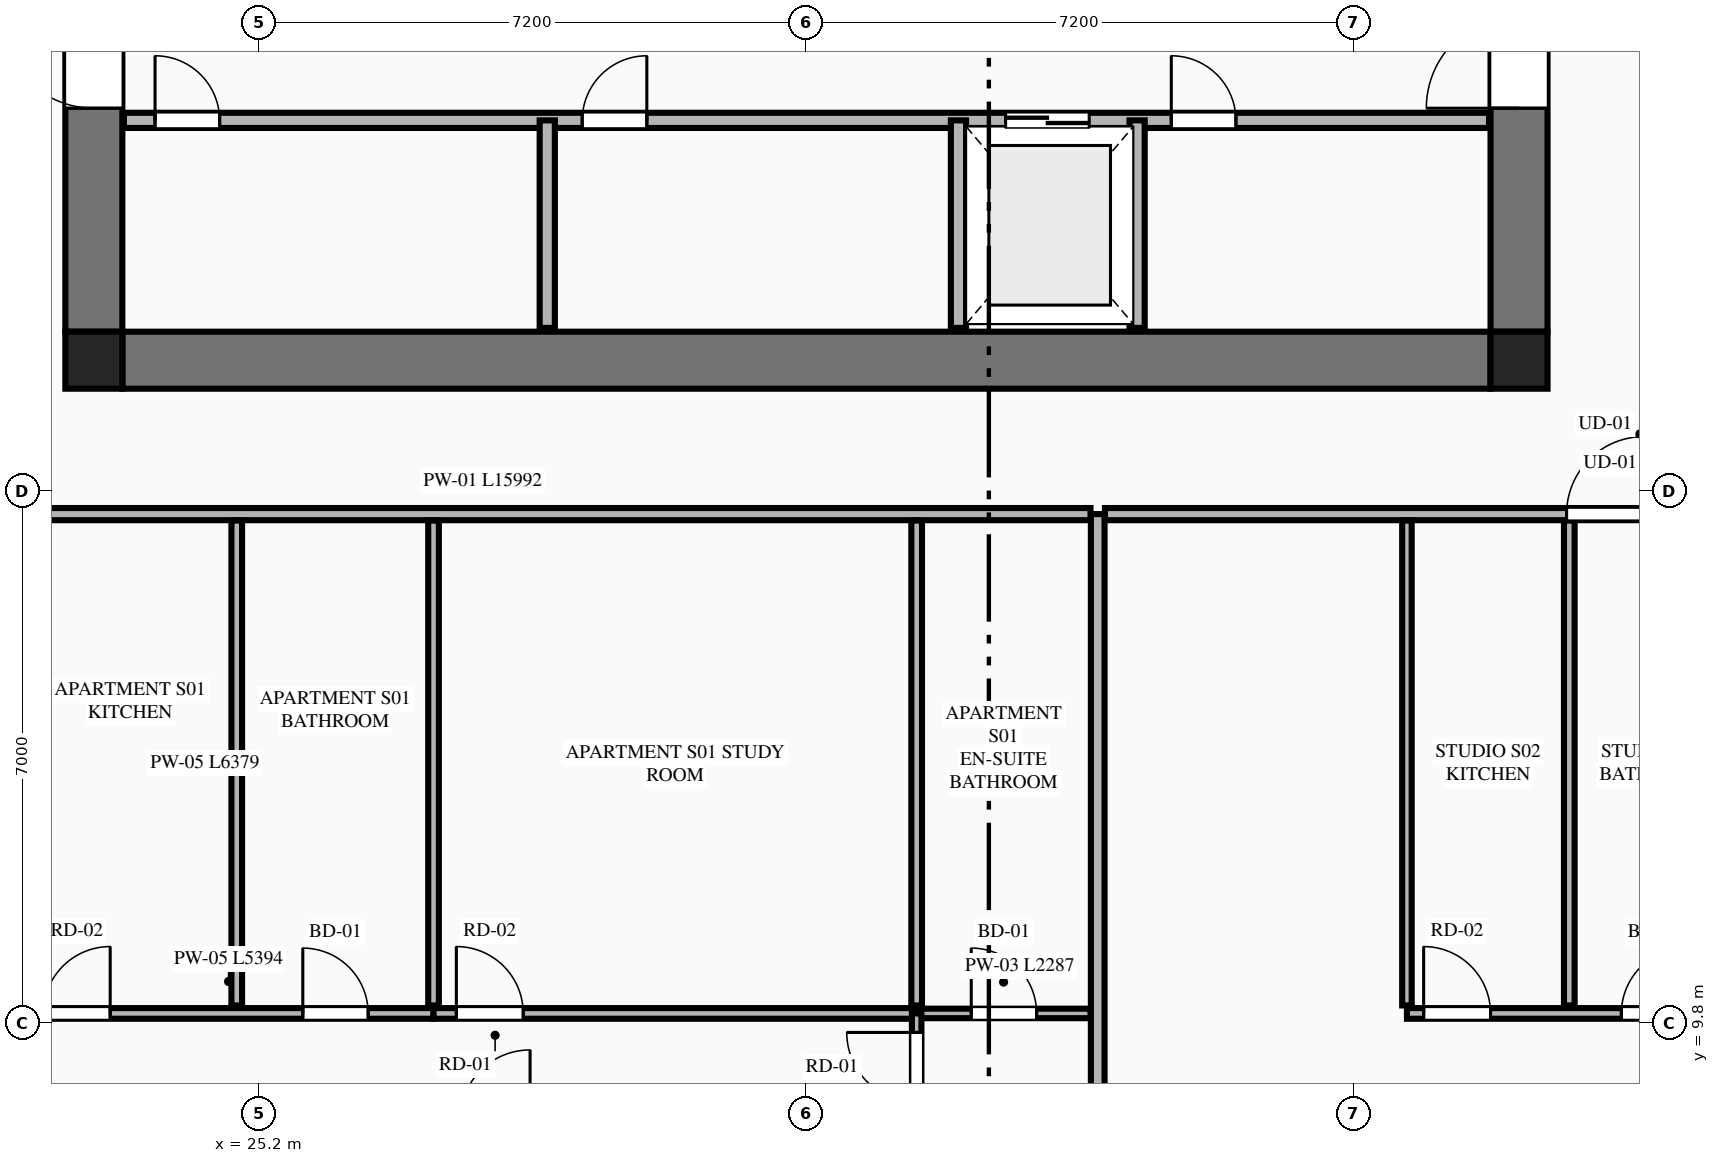
"""IFC4 building model, lengths in metres.
Left out: names, types, materials, properties, quantities, classifications, styles, units other than length and angle.
Written with IfcOpenShell. Run it as: python <this file> out.ifc"""

import sys

from ifc_helpers import new_model, si_unit, direction, frame, frame_2d, origin, origin_2d, place, context, subcontext, project, spatial, rectangle, extrude, element, fill, save


model = new_model("IFC4")
c1 = context("Model", 3, precision=1e-05, world=origin(), true_north=direction((0.0, 1.0)))
c2 = subcontext(c1, "Body", "Model", "MODEL_VIEW")
j1 = project(units=[si_unit("LENGTHUNIT", "METRE"), si_unit("PLANEANGLEUNIT", "RADIAN")], contexts=[c1])
p1 = place(None, origin())
s1 = spatial("IfcSite", under=j1, at=p1, CompositionType="ELEMENT")
p2 = place(p1, origin())
s2 = spatial("IfcBuilding", under=s1, at=p2, CompositionType="ELEMENT")
p3 = place(p2, frame((0.0, 0.0, 105.5)))
s3 = spatial("IfcBuildingStorey", under=s2, at=p3, CompositionType="ELEMENT", Elevation=105.5)
for number, where, z_axis, x_axis in (
    (1, (23.025, 18.525, 0.0), (0.0, 0.0, 1.0), (1.0, 0.0, 0.0)),
    (2, (41.775, 18.525, 0.0), (0.0, 0.0, 1.0), (1.0, 0.0, 0.0)),
):
    element("IfcColumn", number, at=place(p3, frame(where, z_axis=z_axis, x_axis=x_axis)), inside=s3, PredefinedType="COLUMN", context=c2, shape_type="SweptSolid", body=[
        extrude(rectangle(XDim=0.75, YDim=0.75, at=origin_2d()), origin(), (0.0, 0.0, 1.0), 3.55),
    ])
p4 = place(p3, frame((23.4, 18.525, 0.0), z_axis=(0.0, 0.0, 1.0), x_axis=(1.0, 0.0, 0.0)))
e3 = element("IfcWall", 3, at=p4, inside=s3, PredefinedType="SHEAR", context=c2, shape_type="SweptSolid", body=[
    extrude(rectangle(XDim=18.0, YDim=0.75, at=frame_2d((9.0, 0.0))), origin(), (0.0, 0.0, 1.0), 3.34),
])
p5 = place(p3, frame((23.025, 18.9, 0.0), z_axis=(0.0, 0.0, 1.0), x_axis=(0.0, 1.0, 0.0)))
e4 = element("IfcWall", 4, at=p5, inside=s3, PredefinedType="SHEAR", context=c2, shape_type="SweptSolid", body=[
    extrude(rectangle(XDim=14.0, YDim=0.75, at=frame_2d((7.0, 0.0))), origin(), (0.0, 0.0, 1.0), 3.34),
])
p6 = place(p5, frame((2.94, 0.0, 0.0)))
e5 = element("IfcOpeningElement", 5, at=p6, cuts=e4, PredefinedType="OPENING", context=c2, shape_type="SweptSolid", body=[
    extrude(rectangle(XDim=1.22, YDim=2.25, at=frame_2d((0.61, 1.125))), frame((0.0, 0.385, 0.0), z_axis=(0.0, -1.0, 0.0), x_axis=(1.0, 0.0, 0.0)), (0.0, 0.0, 1.0), 0.77),
])
p7 = place(p3, frame((41.775, 18.9, 0.0), z_axis=(0.0, 0.0, 1.0), x_axis=(0.0, 1.0, 0.0)))
e6 = element("IfcWall", 6, at=p7, inside=s3, PredefinedType="SHEAR", context=c2, shape_type="SweptSolid", body=[
    extrude(rectangle(XDim=14.0, YDim=0.75, at=frame_2d((7.0, 0.0))), origin(), (0.0, 0.0, 1.0), 3.34),
])
p8 = place(p7, frame((2.94, 0.0, 0.0)))
e7 = element("IfcOpeningElement", 7, at=p8, cuts=e6, PredefinedType="OPENING", context=c2, shape_type="SweptSolid", body=[
    extrude(rectangle(XDim=1.22, YDim=2.25, at=frame_2d((0.61, 1.125))), frame((0.0, 0.385, 0.0), z_axis=(0.0, -1.0, 0.0), x_axis=(1.0, 0.0, 0.0)), (0.0, 0.0, 1.0), 0.77),
])
p9 = place(p3, frame((23.42, 21.68, 0.0), z_axis=(0.0, 0.0, 1.0), x_axis=(1.0, 0.0, 0.0)))
e8 = element("IfcWall", 8, at=p9, inside=s3, PredefinedType="PLUMBINGWALL", context=c2, shape_type="SweptSolid", body=[
    extrude(rectangle(XDim=17.96, YDim=0.2, at=frame_2d((8.98, 0.0))), origin(), (0.0, 0.0, 1.0), 3.34),
])
p10 = place(p9, frame((11.6, 0.0, 0.0)))
e9 = element("IfcOpeningElement", 9, at=p10, cuts=e8, PredefinedType="OPENING", context=c2, shape_type="SweptSolid", body=[
    extrude(rectangle(XDim=1.1, YDim=2.2, at=frame_2d((0.55, 1.1))), frame((0.0, 0.11, 0.0), z_axis=(0.0, -1.0, 0.0), x_axis=(1.0, 0.0, 0.0)), (0.0, 0.0, 1.0), 0.22),
])
p11 = place(p9, frame((0.41, 0.0, 0.0)))
e10 = element("IfcOpeningElement", 10, at=p11, cuts=e8, PredefinedType="OPENING", context=c2, shape_type="SweptSolid", body=[
    extrude(rectangle(XDim=0.85, YDim=2.05, at=frame_2d((0.425, 1.025))), frame((0.0, 0.11, 0.0), z_axis=(0.0, -1.0, 0.0), x_axis=(1.0, 0.0, 0.0)), (0.0, 0.0, 1.0), 0.22),
])
p12 = place(p9, frame((6.03, 0.0, 0.0)))
e11 = element("IfcOpeningElement", 11, at=p12, cuts=e8, PredefinedType="OPENING", context=c2, shape_type="SweptSolid", body=[
    extrude(rectangle(XDim=0.85, YDim=2.05, at=frame_2d((0.425, 1.025))), frame((0.0, 0.11, 0.0), z_axis=(0.0, -1.0, 0.0), x_axis=(1.0, 0.0, 0.0)), (0.0, 0.0, 1.0), 0.22),
])
p13 = place(p9, frame((13.78, 0.0, 0.0)))
e12 = element("IfcOpeningElement", 12, at=p13, cuts=e8, PredefinedType="OPENING", context=c2, shape_type="SweptSolid", body=[
    extrude(rectangle(XDim=0.85, YDim=2.05, at=frame_2d((0.425, 1.025))), frame((0.0, 0.11, 0.0), z_axis=(0.0, -1.0, 0.0), x_axis=(1.0, 0.0, 0.0)), (0.0, 0.0, 1.0), 0.22),
])
for number, where, z_axis, x_axis in (
    (13, (34.4, 18.95, 0.0), (0.0, 0.0, 1.0), (0.0, 1.0, 0.0)),
    (14, (36.75, 18.95, 0.0), (0.0, 0.0, 1.0), (0.0, 1.0, 0.0)),
    (15, (28.99, 18.95, 0.0), (0.0, 0.0, 1.0), (0.0, 1.0, 0.0)),
):
    element("IfcWall", number, at=place(p3, frame(where, z_axis=z_axis, x_axis=x_axis)), inside=s3, PredefinedType="PLUMBINGWALL", context=c2, shape_type="SweptSolid", body=[
        extrude(rectangle(XDim=2.73, YDim=0.2, at=frame_2d((1.365, 0.0))), origin(), (0.0, 0.0, 1.0), 3.34),
    ])
p14 = place(p3, frame((36.232, 4.105, 0.0), z_axis=(0.0, 0.0, 1.0), x_axis=(0.0, 1.0, 0.0)))
e16 = element("IfcWall", 16, at=p14, inside=s3, PredefinedType="PARTITIONING", context=c2, shape_type="SweptSolid", body=[
    extrude(rectangle(XDim=12.395, YDim=0.18, at=frame_2d((6.198, 0.0))), origin(), (0.0, 0.0, 1.0), 2.722),
])
p15 = place(p3, frame((20.145, 16.5, 0.0), z_axis=(0.0, 0.0, 1.0), x_axis=(1.0, 0.0, 0.0)))
e17 = element("IfcWall", 17, at=p15, inside=s3, PredefinedType="PARTITIONING", context=c2, shape_type="SweptSolid", body=[
    extrude(rectangle(XDim=15.992, YDim=0.16, at=frame_2d((7.996, 0.0))), origin(), (0.0, 0.0, 1.0), 3.34),
])
p16 = place(p15, frame((0.405, 0.0, 0.0)))
e18 = element("IfcOpeningElement", 18, at=p16, cuts=e17, PredefinedType="OPENING", context=c2, shape_type="SweptSolid", body=[
    extrude(rectangle(XDim=1.35, YDim=2.35, at=frame_2d((0.675, 1.175))), frame((0.0, 0.09, 0.0), z_axis=(0.0, -1.0, 0.0), x_axis=(1.0, 0.0, 0.0)), (0.0, 0.0, 1.0), 0.18),
])
p17 = place(p3, frame((22.1, 9.931, 0.0), z_axis=(0.0, 0.0, 1.0), x_axis=(1.0, 0.0, 0.0)))
e19 = element("IfcWall", 19, at=p17, inside=s3, PredefinedType="PLUMBINGWALL", context=c2, shape_type="SweptSolid", body=[
    extrude(rectangle(XDim=5.394, YDim=0.14, at=frame_2d((2.697, 0.0))), origin(), (0.0, 0.0, 1.0), 3.34),
])
p18 = place(p17, frame((3.674, 0.0, 0.0)))
e20 = element("IfcOpeningElement", 20, at=p18, cuts=e19, PredefinedType="OPENING", context=c2, shape_type="SweptSolid", body=[
    extrude(rectangle(XDim=0.86, YDim=2.1, at=frame_2d((0.43, 1.05))), frame((0.0, 0.08, 0.0), z_axis=(0.0, -1.0, 0.0), x_axis=(1.0, 0.0, 0.0)), (0.0, 0.0, 1.0), 0.16),
])
p19 = place(p17, frame((0.26, 0.0, 0.0)))
e21 = element("IfcOpeningElement", 21, at=p19, cuts=e19, PredefinedType="OPENING", context=c2, shape_type="SweptSolid", body=[
    extrude(rectangle(XDim=0.88, YDim=2.15, at=frame_2d((0.44, 1.075))), frame((0.0, 0.08, 0.0), z_axis=(0.0, -1.0, 0.0), x_axis=(1.0, 0.0, 0.0)), (0.0, 0.0, 1.0), 0.16),
])
p20 = place(p3, frame((27.494, 9.931, 0.0), z_axis=(0.0, 0.0, 1.0), x_axis=(1.0, 0.0, 0.0)))
e22 = element("IfcWall", 22, at=p20, inside=s3, PredefinedType="PLUMBINGWALL", context=c2, shape_type="SweptSolid", body=[
    extrude(rectangle(XDim=6.356, YDim=0.14, at=frame_2d((3.178, 0.0))), origin(), (0.0, 0.0, 1.0), 3.34),
])
p21 = place(p20, frame((0.3, 0.0, 0.0)))
e23 = element("IfcOpeningElement", 23, at=p21, cuts=e22, PredefinedType="OPENING", context=c2, shape_type="SweptSolid", body=[
    extrude(rectangle(XDim=0.88, YDim=2.15, at=frame_2d((0.44, 1.075))), frame((0.0, 0.08, 0.0), z_axis=(0.0, -1.0, 0.0), x_axis=(1.0, 0.0, 0.0)), (0.0, 0.0, 1.0), 0.16),
])
p22 = place(p3, frame((33.85, 9.931, 0.0), z_axis=(0.0, 0.0, 1.0), x_axis=(1.0, 0.0, 0.0)))
e24 = element("IfcWall", 24, at=p22, inside=s3, PredefinedType="PARTITIONING", context=c2, shape_type="SweptSolid", body=[
    extrude(rectangle(XDim=2.287, YDim=0.125, at=frame_2d((1.144, 0.0))), origin(), (0.0, 0.0, 1.0), 3.34),
])
p23 = place(p22, frame((0.718, 0.0, 0.0)))
e25 = element("IfcOpeningElement", 25, at=p23, cuts=e24, PredefinedType="OPENING", context=c2, shape_type="SweptSolid", body=[
    extrude(rectangle(XDim=0.86, YDim=2.1, at=frame_2d((0.43, 1.05))), frame((0.0, 0.073, 0.0), z_axis=(0.0, -1.0, 0.0), x_axis=(1.0, 0.0, 0.0)), (0.0, 0.0, 1.0), 0.145),
])
p24 = place(p3, frame((24.905, 10.036, 0.0), z_axis=(0.0, 0.0, 1.0), x_axis=(0.0, 1.0, 0.0)))
e26 = element("IfcWall", 26, at=p24, inside=s3, PredefinedType="PLUMBINGWALL", context=c2, shape_type="SweptSolid", body=[
    extrude(rectangle(XDim=6.379, YDim=0.14, at=frame_2d((3.189, 0.0))), origin(), (0.0, 0.0, 1.0), 3.34),
])
p25 = place(p3, frame((33.85, 8.601, 0.0), z_axis=(0.0, 0.0, 1.0), x_axis=(0.0, 1.0, 0.0)))
e27 = element("IfcWall", 27, at=p25, inside=s3, PredefinedType="PARTITIONING", context=c2, shape_type="SweptSolid", body=[
    extrude(rectangle(XDim=1.33, YDim=0.125, at=frame_2d((0.665, 0.0))), origin(), (0.0, 0.0, 1.0), 3.34),
])
p26 = place(p25, frame((0.16, 0.0, 0.0)))
e28 = element("IfcOpeningElement", 28, at=p26, cuts=e27, PredefinedType="OPENING", context=c2, shape_type="SweptSolid", body=[
    extrude(rectangle(XDim=0.92, YDim=2.15, at=frame_2d((0.46, 1.075))), frame((0.0, 0.073, 0.0), z_axis=(0.0, -1.0, 0.0), x_axis=(1.0, 0.0, 0.0)), (0.0, 0.0, 1.0), 0.145),
])
for number, where, z_axis, x_axis in (
    (29, (27.494, 10.036, 0.0), (0.0, 0.0, 1.0), (0.0, 1.0, 0.0)),
    (30, (33.85, 10.036, 0.0), (0.0, 0.0, 1.0), (0.0, 1.0, 0.0)),
):
    element("IfcWall", number, at=place(p3, frame(where, z_axis=z_axis, x_axis=x_axis)), inside=s3, PredefinedType="PLUMBINGWALL", context=c2, shape_type="SweptSolid", body=[
        extrude(rectangle(XDim=6.379, YDim=0.14, at=frame_2d((3.189, 0.0))), origin(), (0.0, 0.0, 1.0), 3.34),
    ])
p27 = place(p3, frame((36.327, 16.5, 0.0), z_axis=(0.0, 0.0, 1.0), x_axis=(1.0, 0.0, 0.0)))
e31 = element("IfcWall", 31, at=p27, inside=s3, PredefinedType="PARTITIONING", context=c2, shape_type="SweptSolid", body=[
    extrude(rectangle(XDim=8.328, YDim=0.16, at=frame_2d((4.164, 0.0))), origin(), (0.0, 0.0, 1.0), 3.34),
])
p28 = place(p27, frame((6.073, 0.0, 0.0)))
e32 = element("IfcOpeningElement", 32, at=p28, cuts=e31, PredefinedType="OPENING", context=c2, shape_type="SweptSolid", body=[
    extrude(rectangle(XDim=1.02, YDim=2.25, at=frame_2d((0.51, 1.125))), frame((0.0, 0.09, 0.0), z_axis=(0.0, -1.0, 0.0), x_axis=(1.0, 0.0, 0.0)), (0.0, 0.0, 1.0), 0.18),
])
p29 = place(p3, frame((40.3, 10.036, 0.0), z_axis=(0.0, 0.0, 1.0), x_axis=(0.0, 1.0, 0.0)))
e33 = element("IfcWall", 33, at=p29, inside=s3, PredefinedType="PARTITIONING", context=c2, shape_type="SweptSolid", body=[
    extrude(rectangle(XDim=6.379, YDim=0.125, at=frame_2d((3.189, 0.0))), origin(), (0.0, 0.0, 1.0), 3.34),
])
p30 = place(p3, frame((40.3, 9.931, 0.0), z_axis=(0.0, 0.0, 1.0), x_axis=(1.0, 0.0, 0.0)))
e34 = element("IfcWall", 34, at=p30, inside=s3, PredefinedType="PLUMBINGWALL", context=c2, shape_type="SweptSolid", body=[
    extrude(rectangle(XDim=4.355, YDim=0.14, at=frame_2d((2.177, 0.0))), origin(), (0.0, 0.0, 1.0), 3.34),
])
p31 = place(p30, frame((2.821, 0.0, 0.0)))
e35 = element("IfcOpeningElement", 35, at=p31, cuts=e34, PredefinedType="OPENING", context=c2, shape_type="SweptSolid", body=[
    extrude(rectangle(XDim=0.86, YDim=2.1, at=frame_2d((0.43, 1.05))), frame((0.0, 0.08, 0.0), z_axis=(0.0, -1.0, 0.0), x_axis=(1.0, 0.0, 0.0)), (0.0, 0.0, 1.0), 0.16),
])
p32 = place(p30, frame((0.22, 0.0, 0.0)))
e36 = element("IfcOpeningElement", 36, at=p32, cuts=e34, PredefinedType="OPENING", context=c2, shape_type="SweptSolid", body=[
    extrude(rectangle(XDim=0.88, YDim=2.15, at=frame_2d((0.44, 1.075))), frame((0.0, 0.08, 0.0), z_axis=(0.0, -1.0, 0.0), x_axis=(1.0, 0.0, 0.0)), (0.0, 0.0, 1.0), 0.16),
])
p33 = place(p3, frame((42.436, 10.036, 0.0), z_axis=(0.0, 0.0, 1.0), x_axis=(0.0, 1.0, 0.0)))
e37 = element("IfcWall", 37, at=p33, inside=s3, PredefinedType="PLUMBINGWALL", context=c2, shape_type="SweptSolid", body=[
    extrude(rectangle(XDim=6.379, YDim=0.14, at=frame_2d((3.189, 0.0))), origin(), (0.0, 0.0, 1.0), 2.722),
])
p34 = place(p6, origin())
e38 = element("IfcDoor", 38, at=p34, inside=s3, OperationType="SINGLE_SWING_RIGHT", PredefinedType="DOOR", context=c2, shape_type="SweptSolid", body=[
    extrude(rectangle(XDim=1.22, YDim=2.25, at=frame_2d((0.61, 1.125))), frame((0.0, 0.025, 0.0), z_axis=(0.0, -1.0, 0.0), x_axis=(1.0, 0.0, 0.0)), (0.0, 0.0, 1.0), 0.05),
])
fill(e5, e38)
p35 = place(p8, origin())
e39 = element("IfcDoor", 39, at=p35, inside=s3, OperationType="SINGLE_SWING_LEFT", PredefinedType="DOOR", context=c2, shape_type="SweptSolid", body=[
    extrude(rectangle(XDim=1.22, YDim=2.25, at=frame_2d((0.61, 1.125))), frame((0.0, 0.025, 0.0), z_axis=(0.0, -1.0, 0.0), x_axis=(1.0, 0.0, 0.0)), (0.0, 0.0, 1.0), 0.05),
])
fill(e7, e39)
p36 = place(p10, origin())
e40 = element("IfcDoor", 40, at=p36, inside=s3, OperationType="DOUBLE_DOOR_SLIDING", PredefinedType="DOOR", context=c2, shape_type="SweptSolid", body=[
    extrude(rectangle(XDim=1.1, YDim=2.2, at=frame_2d((0.55, 1.1))), frame((0.0, 0.025, 0.0), z_axis=(0.0, -1.0, 0.0), x_axis=(1.0, 0.0, 0.0)), (0.0, 0.0, 1.0), 0.05),
])
fill(e9, e40)
p37 = place(p11, origin())
e41 = element("IfcDoor", 41, at=p37, inside=s3, OperationType="SINGLE_SWING_LEFT", PredefinedType="DOOR", context=c2, shape_type="SweptSolid", body=[
    extrude(rectangle(XDim=0.85, YDim=2.05, at=frame_2d((0.425, 1.025))), frame((0.0, 0.025, 0.0), z_axis=(0.0, -1.0, 0.0), x_axis=(1.0, 0.0, 0.0)), (0.0, 0.0, 1.0), 0.05),
])
fill(e10, e41)
p38 = place(p12, origin())
e42 = element("IfcDoor", 42, at=p38, inside=s3, OperationType="SINGLE_SWING_RIGHT", PredefinedType="DOOR", context=c2, shape_type="SweptSolid", body=[
    extrude(rectangle(XDim=0.85, YDim=2.05, at=frame_2d((0.425, 1.025))), frame((0.0, 0.025, 0.0), z_axis=(0.0, -1.0, 0.0), x_axis=(1.0, 0.0, 0.0)), (0.0, 0.0, 1.0), 0.05),
])
fill(e11, e42)
p39 = place(p13, origin())
e43 = element("IfcDoor", 43, at=p39, inside=s3, OperationType="SINGLE_SWING_LEFT", PredefinedType="DOOR", context=c2, shape_type="SweptSolid", body=[
    extrude(rectangle(XDim=0.85, YDim=2.05, at=frame_2d((0.425, 1.025))), frame((0.0, 0.025, 0.0), z_axis=(0.0, -1.0, 0.0), x_axis=(1.0, 0.0, 0.0)), (0.0, 0.0, 1.0), 0.05),
])
fill(e12, e43)
p40 = place(p18, origin())
e44 = element("IfcDoor", 44, at=p40, inside=s3, OperationType="SINGLE_SWING_LEFT", PredefinedType="DOOR", context=c2, shape_type="SweptSolid", body=[
    extrude(rectangle(XDim=0.86, YDim=2.1, at=frame_2d((0.43, 1.05))), frame((0.0, 0.025, 0.0), z_axis=(0.0, -1.0, 0.0), x_axis=(1.0, 0.0, 0.0)), (0.0, 0.0, 1.0), 0.05),
])
fill(e20, e44)
p41 = place(p23, origin())
e45 = element("IfcDoor", 45, at=p41, inside=s3, OperationType="SINGLE_SWING_LEFT", PredefinedType="DOOR", context=c2, shape_type="SweptSolid", body=[
    extrude(rectangle(XDim=0.86, YDim=2.1, at=frame_2d((0.43, 1.05))), frame((0.0, 0.025, 0.0), z_axis=(0.0, -1.0, 0.0), x_axis=(1.0, 0.0, 0.0)), (0.0, 0.0, 1.0), 0.05),
])
fill(e25, e45)
p42 = place(p19, origin())
e46 = element("IfcDoor", 46, at=p42, inside=s3, OperationType="SINGLE_SWING_RIGHT", PredefinedType="DOOR", context=c2, shape_type="SweptSolid", body=[
    extrude(rectangle(XDim=0.88, YDim=2.15, at=frame_2d((0.44, 1.075))), frame((0.0, 0.025, 0.0), z_axis=(0.0, -1.0, 0.0), x_axis=(1.0, 0.0, 0.0)), (0.0, 0.0, 1.0), 0.05),
])
fill(e21, e46)
p43 = place(p21, origin())
e47 = element("IfcDoor", 47, at=p43, inside=s3, OperationType="SINGLE_SWING_LEFT", PredefinedType="DOOR", context=c2, shape_type="SweptSolid", body=[
    extrude(rectangle(XDim=0.88, YDim=2.15, at=frame_2d((0.44, 1.075))), frame((0.0, 0.025, 0.0), z_axis=(0.0, -1.0, 0.0), x_axis=(1.0, 0.0, 0.0)), (0.0, 0.0, 1.0), 0.05),
])
fill(e23, e47)
p44 = place(p26, origin())
e48 = element("IfcDoor", 48, at=p44, inside=s3, OperationType="SINGLE_SWING_RIGHT", PredefinedType="DOOR", context=c2, shape_type="SweptSolid", body=[
    extrude(rectangle(XDim=0.92, YDim=2.15, at=frame_2d((0.46, 1.075))), frame((0.0, 0.025, 0.0), z_axis=(0.0, -1.0, 0.0), x_axis=(1.0, 0.0, 0.0)), (0.0, 0.0, 1.0), 0.05),
])
fill(e28, e48)
p45 = place(p31, origin())
e49 = element("IfcDoor", 49, at=p45, inside=s3, OperationType="SINGLE_SWING_RIGHT", PredefinedType="DOOR", context=c2, shape_type="SweptSolid", body=[
    extrude(rectangle(XDim=0.86, YDim=2.1, at=frame_2d((0.43, 1.05))), frame((0.0, 0.025, 0.0), z_axis=(0.0, -1.0, 0.0), x_axis=(1.0, 0.0, 0.0)), (0.0, 0.0, 1.0), 0.05),
])
fill(e35, e49)
p46 = place(p28, origin())
e50 = element("IfcDoor", 50, at=p46, inside=s3, OperationType="SINGLE_SWING_RIGHT", PredefinedType="DOOR", context=c2, shape_type="SweptSolid", body=[
    extrude(rectangle(XDim=1.02, YDim=2.25, at=frame_2d((0.51, 1.125))), frame((0.0, 0.025, 0.0), z_axis=(0.0, -1.0, 0.0), x_axis=(1.0, 0.0, 0.0)), (0.0, 0.0, 1.0), 0.05),
])
fill(e32, e50)
p47 = place(p32, origin())
e51 = element("IfcDoor", 51, at=p47, inside=s3, OperationType="SINGLE_SWING_LEFT", PredefinedType="DOOR", context=c2, shape_type="SweptSolid", body=[
    extrude(rectangle(XDim=0.88, YDim=2.15, at=frame_2d((0.44, 1.075))), frame((0.0, 0.025, 0.0), z_axis=(0.0, -1.0, 0.0), x_axis=(1.0, 0.0, 0.0)), (0.0, 0.0, 1.0), 0.05),
])
fill(e36, e51)
save(model, sys.argv[1])
